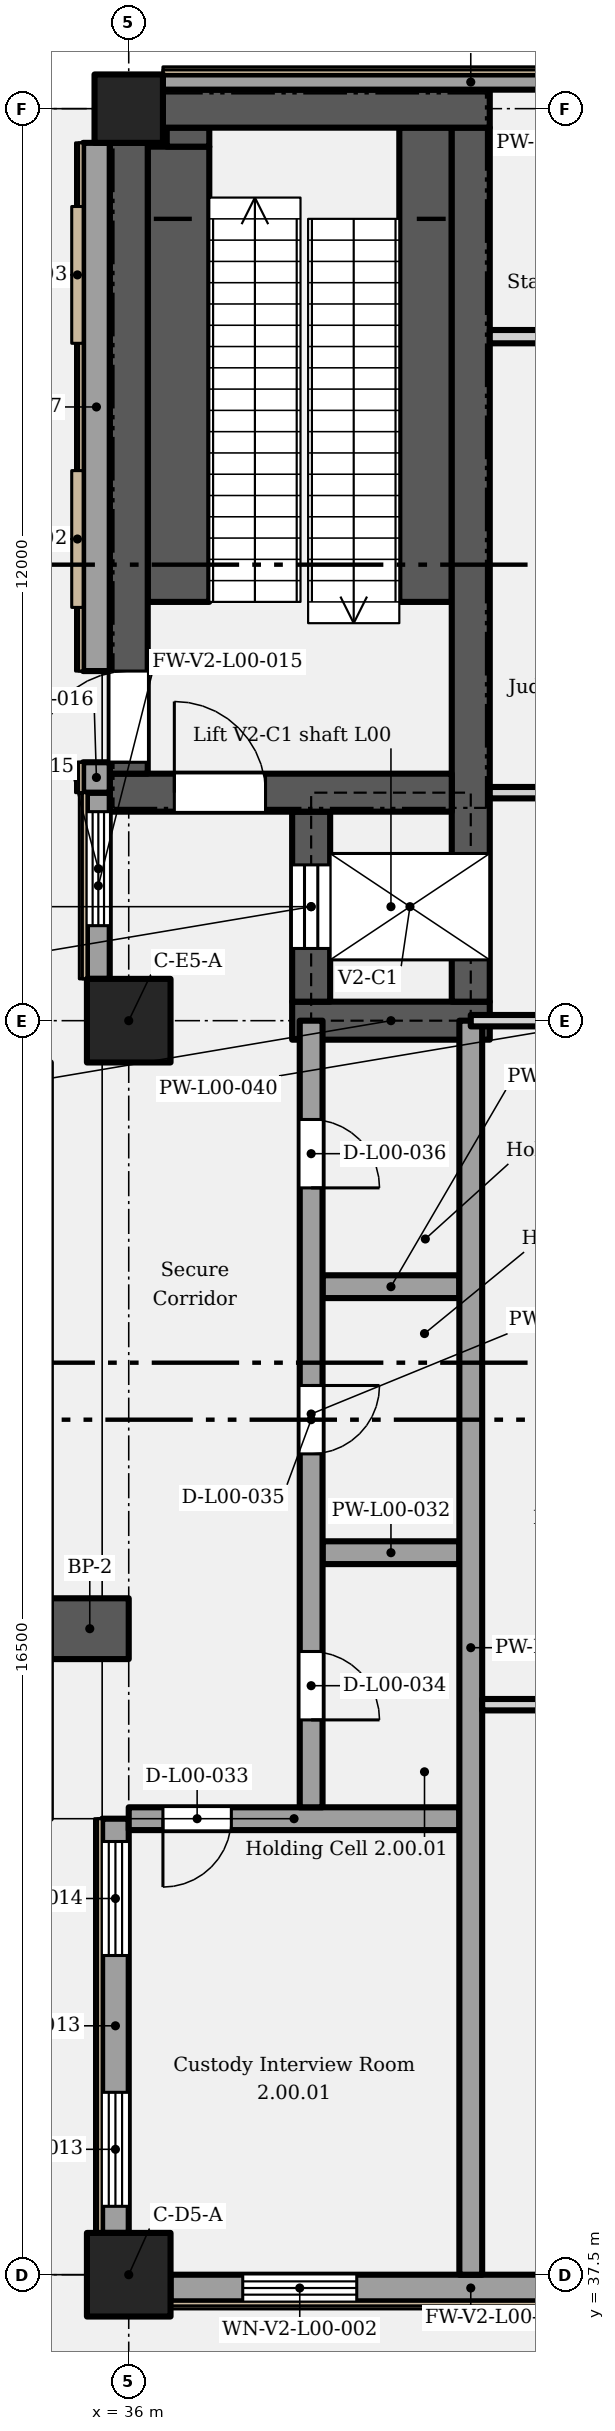
"""IFC4 building model, lengths in metres.
Left out: names, types, materials, properties, quantities, classifications, styles, units other than length and angle.
Written with IfcOpenShell. Run it as: python <this file> out.ifc"""

import sys

from ifc_helpers import new_model, si_unit, direction, frame, frame_2d, origin, origin_2d, place, context, subcontext, project, spatial, rectangle, extrude, element, fill, save


model = new_model("IFC4")
c1 = context("Model", 3, precision=1e-05, world=origin(), true_north=direction((0.0, 1.0)))
c2 = subcontext(c1, "Body", "Model", "MODEL_VIEW")
j1 = project(units=[si_unit("LENGTHUNIT", "METRE"), si_unit("PLANEANGLEUNIT", "RADIAN")], contexts=[c1])
p1 = place(None, origin())
s1 = spatial("IfcSite", under=j1, at=p1, CompositionType="ELEMENT")
p2 = place(p1, origin())
s2 = spatial("IfcBuilding", under=s1, at=p2, CompositionType="ELEMENT")
p3 = place(p2, origin())
s3 = spatial("IfcBuildingStorey", under=s2, at=p3, CompositionType="ELEMENT", Elevation=0.0)
for number, where, z_axis, x_axis in (
    (1, (36.0, 37.5, 0.0), (0.0, 0.0, 1.0), (1.0, 0.0, 0.0)),
    (2, (36.0, 54.0, 0.0), (0.0, 0.0, 1.0), (1.0, 0.0, 0.0)),
):
    element("IfcColumn", number, at=place(p3, frame(where, z_axis=z_axis, x_axis=x_axis)), inside=s3, PredefinedType="COLUMN", context=c2, shape_type="SweptSolid", body=[
        extrude(rectangle(XDim=1.1, YDim=1.1, at=origin_2d()), origin(), (0.0, 0.0, 1.0), 6.6),
    ])
p4 = place(p3, frame((36.0, 66.0, 0.0), z_axis=(0.0, 0.0, 1.0), x_axis=(1.0, 0.0, 0.0)))
e3 = element("IfcColumn", 3, at=p4, inside=s3, PredefinedType="COLUMN", context=c2, shape_type="SweptSolid", body=[
    extrude(rectangle(XDim=0.9, YDim=0.9, at=origin_2d()), origin(), (0.0, 0.0, 1.0), 6.6),
])
p5 = place(p3, frame((38.15, 54.0, 0.0), z_axis=(0.0, 0.0, 1.0), x_axis=(1.0, 0.0, 0.0)))
e4 = element("IfcWall", 4, at=p5, inside=s3, PredefinedType="SHEAR", context=c2, shape_type="SweptSolid", body=[
    extrude(rectangle(XDim=2.6, YDim=0.5, at=frame_2d((1.3, 0.0))), origin(), (0.0, 0.0, 1.0), 6.3),
])
p6 = place(p3, frame((38.4, 54.25, 0.0), z_axis=(0.0, 0.0, 1.0), x_axis=(0.0, 1.0, 0.0)))
e5 = element("IfcWall", 5, at=p6, inside=s3, PredefinedType="SHEAR", context=c2, shape_type="SweptSolid", body=[
    extrude(rectangle(XDim=2.5, YDim=0.5, at=frame_2d((1.25, 0.0))), origin(), (0.0, 0.0, 1.0), 6.3),
])
p7 = place(p6, frame((0.7, 0.0, 0.0)))
e6 = element("IfcOpeningElement", 6, at=p7, cuts=e5, PredefinedType="OPENING", context=c2, shape_type="SweptSolid", body=[
    extrude(rectangle(XDim=1.1, YDim=2.1, at=frame_2d((0.55, 1.05))), frame((0.0, 0.26, 0.0), z_axis=(0.0, -1.0, 0.0), x_axis=(1.0, 0.0, 0.0)), (0.0, 0.0, 1.0), 0.52),
])
p8 = place(p3, frame((40.5, 54.25, 0.0), z_axis=(0.0, 0.0, 1.0), x_axis=(0.0, 1.0, 0.0)))
e7 = element("IfcWall", 7, at=p8, inside=s3, PredefinedType="SHEAR", context=c2, shape_type="SweptSolid", body=[
    extrude(rectangle(XDim=11.5, YDim=0.5, at=frame_2d((5.75, 0.0))), origin(), (0.0, 0.0, 1.0), 6.3),
])
p9 = place(p3, frame((35.75, 57.0, 0.0), z_axis=(0.0, 0.0, 1.0), x_axis=(1.0, 0.0, 0.0)))
e8 = element("IfcWall", 8, at=p9, inside=s3, PredefinedType="SHEAR", context=c2, shape_type="SweptSolid", body=[
    extrude(rectangle(XDim=4.5, YDim=0.5, at=frame_2d((2.25, 0.0))), origin(), (0.0, 0.0, 1.0), 6.3),
])
p10 = place(p9, frame((0.85, 0.0, 0.0)))
e9 = element("IfcOpeningElement", 9, at=p10, cuts=e8, PredefinedType="OPENING", context=c2, shape_type="SweptSolid", body=[
    extrude(rectangle(XDim=1.2, YDim=2.1, at=frame_2d((0.6, 1.05))), frame((0.0, 0.26, 0.0), z_axis=(0.0, -1.0, 0.0), x_axis=(1.0, 0.0, 0.0)), (0.0, 0.0, 1.0), 0.52),
])
p11 = place(p3, frame((36.0, 57.25, 0.0), z_axis=(0.0, 0.0, 1.0), x_axis=(0.0, 1.0, 0.0)))
e10 = element("IfcWall", 10, at=p11, inside=s3, PredefinedType="SHEAR", context=c2, shape_type="SweptSolid", body=[
    extrude(rectangle(XDim=8.3, YDim=0.5, at=frame_2d((4.15, 0.0))), origin(), (0.0, 0.0, 1.0), 6.3),
])
p12 = place(p11, frame((0.15, 0.0, 0.0)))
e11 = element("IfcOpeningElement", 11, at=p12, cuts=e10, PredefinedType="OPENING", context=c2, shape_type="SweptSolid", body=[
    extrude(rectangle(XDim=1.2, YDim=2.1, at=frame_2d((0.6, 1.05))), frame((0.0, 0.26, 0.0), z_axis=(0.0, -1.0, 0.0), x_axis=(1.0, 0.0, 0.0)), (0.0, 0.0, 1.0), 0.52),
])
p13 = place(p3, frame((36.45, 66.0, 0.0), z_axis=(0.0, 0.0, 1.0), x_axis=(1.0, 0.0, 0.0)))
e12 = element("IfcWall", 12, at=p13, inside=s3, PredefinedType="SHEAR", context=c2, shape_type="SweptSolid", body=[
    extrude(rectangle(XDim=4.3, YDim=0.5, at=frame_2d((2.15, 0.0))), origin(), (0.0, 0.0, 1.0), 6.3),
])
p14 = place(p3, frame((35.488, 45.6, 0.0), z_axis=(0.0, 0.0, 1.0), x_axis=(0.0, 1.0, 0.0)))
e13 = element("IfcWall", 13, at=p14, inside=s3, PredefinedType="SOLIDWALL", context=c2, shape_type="SweptSolid", body=[
    extrude(rectangle(XDim=0.8, YDim=1.025, at=frame_2d((0.4, 0.0))), origin(), (0.0, 0.0, 1.0), 5.8),
])
p15 = place(p3, frame((36.55, 37.325, 0.0), z_axis=(0.0, 0.0, 1.0), x_axis=(1.0, 0.0, 0.0)))
e14 = element("IfcWall", 14, at=p15, inside=s3, PredefinedType="SOLIDWALL", context=c2, shape_type="SweptSolid", body=[
    extrude(rectangle(XDim=7.9, YDim=0.35, at=frame_2d((3.95, 0.0))), origin(), (0.0, 0.0, 1.0), 6.3),
])
p16 = place(p15, frame((6.425, 0.0, 1.05)))
e15 = element("IfcOpeningElement", 15, at=p16, cuts=e14, PredefinedType="OPENING", context=c2, shape_type="SweptSolid", body=[
    extrude(rectangle(XDim=1.05, YDim=2.4, at=frame_2d((0.525, 1.2))), frame((0.0, 0.185, 0.0), z_axis=(0.0, -1.0, 0.0), x_axis=(1.0, 0.0, 0.0)), (0.0, 0.0, 1.0), 0.37),
])
p17 = place(p15, frame((0.95, 0.0, 1.05)))
e16 = element("IfcOpeningElement", 16, at=p17, cuts=e14, PredefinedType="OPENING", context=c2, shape_type="SweptSolid", body=[
    extrude(rectangle(XDim=1.5, YDim=3.9, at=frame_2d((0.75, 1.95))), frame((0.0, 0.185, 0.0), z_axis=(0.0, -1.0, 0.0), x_axis=(1.0, 0.0, 0.0)), (0.0, 0.0, 1.0), 0.37),
])
p18 = place(p3, frame((36.45, 66.35, 0.0), z_axis=(0.0, 0.0, 1.0), x_axis=(1.0, 0.0, 0.0)))
e17 = element("IfcWall", 17, at=p18, inside=s3, PredefinedType="SOLIDWALL", context=c2, shape_type="SweptSolid", body=[
    extrude(rectangle(XDim=8.1, YDim=0.2, at=frame_2d((4.05, 0.0))), origin(), (0.0, 0.0, 1.0), 6.3),
])
p19 = place(p18, frame((5.7, 0.0, 0.0)))
e18 = element("IfcOpeningElement", 18, at=p19, cuts=e17, PredefinedType="OPENING", context=c2, shape_type="SweptSolid", body=[
    extrude(rectangle(XDim=1.2, YDim=2.1, at=frame_2d((0.6, 1.05))), frame((0.0, 0.11, 0.0), z_axis=(0.0, -1.0, 0.0), x_axis=(1.0, 0.0, 0.0)), (0.0, 0.0, 1.0), 0.22),
])
p20 = place(p3, frame((35.825, 38.05, 0.0), z_axis=(0.0, 0.0, 1.0), x_axis=(0.0, 1.0, 0.0)))
e19 = element("IfcWall", 19, at=p20, inside=s3, PredefinedType="SOLIDWALL", context=c2, shape_type="SweptSolid", body=[
    extrude(rectangle(XDim=5.45, YDim=0.35, at=frame_2d((2.725, 0.0))), origin(), (0.0, 0.0, 1.0), 6.3),
])
p21 = place(p20, frame((0.35, 0.0, 1.05)))
e20 = element("IfcOpeningElement", 20, at=p21, cuts=e19, PredefinedType="OPENING", context=c2, shape_type="SweptSolid", body=[
    extrude(rectangle(XDim=1.5, YDim=3.9, at=frame_2d((0.75, 1.95))), frame((0.0, 0.185, 0.0), z_axis=(0.0, -1.0, 0.0), x_axis=(1.0, 0.0, 0.0)), (0.0, 0.0, 1.0), 0.37),
])
p22 = place(p20, frame((3.65, 0.0, 1.05)))
e21 = element("IfcOpeningElement", 21, at=p22, cuts=e19, PredefinedType="OPENING", context=c2, shape_type="SweptSolid", body=[
    extrude(rectangle(XDim=1.5, YDim=3.9, at=frame_2d((0.75, 1.95))), frame((0.0, 0.185, 0.0), z_axis=(0.0, -1.0, 0.0), x_axis=(1.0, 0.0, 0.0)), (0.0, 0.0, 1.0), 0.37),
])
p23 = place(p3, frame((35.6, 54.55, 0.0), z_axis=(0.0, 0.0, 1.0), x_axis=(0.0, 1.0, 0.0)))
e22 = element("IfcWall", 22, at=p23, inside=s3, PredefinedType="SOLIDWALL", context=c2, shape_type="SweptSolid", body=[
    extrude(rectangle(XDim=2.45, YDim=0.3, at=frame_2d((1.225, 0.0))), origin(), (0.0, 0.0, 1.0), 6.3),
])
p24 = place(p23, frame((0.7, 0.0, 1.05)))
e23 = element("IfcOpeningElement", 23, at=p24, cuts=e22, PredefinedType="OPENING", context=c2, shape_type="SweptSolid", body=[
    extrude(rectangle(XDim=1.5, YDim=3.9, at=frame_2d((0.75, 1.95))), frame((0.0, 0.16, 0.0), z_axis=(0.0, -1.0, 0.0), x_axis=(1.0, 0.0, 0.0)), (0.0, 0.0, 1.0), 0.32),
])
p25 = place(p3, frame((35.575, 57.0, 0.0), z_axis=(0.0, 0.0, 1.0), x_axis=(0.0, 1.0, 0.0)))
e24 = element("IfcWall", 24, at=p25, inside=s3, PredefinedType="SOLIDWALL", context=c2, shape_type="SweptSolid", body=[
    extrude(rectangle(XDim=0.4, YDim=0.35, at=frame_2d((0.2, 0.0))), origin(), (0.0, 0.0, 1.0), 6.3),
])
p26 = place(p3, frame((35.575, 58.6, 0.0), z_axis=(0.0, 0.0, 1.0), x_axis=(0.0, 1.0, 0.0)))
e25 = element("IfcWall", 25, at=p26, inside=s3, PredefinedType="SOLIDWALL", context=c2, shape_type="SweptSolid", body=[
    extrude(rectangle(XDim=6.95, YDim=0.35, at=frame_2d((3.475, 0.0))), origin(), (0.0, 0.0, 1.0), 6.3),
])
p27 = place(p3, frame((36.0, 43.5, 0.0), z_axis=(0.0, 0.0, 1.0), x_axis=(1.0, 0.0, 0.0)))
e26 = element("IfcWall", 26, at=p27, inside=s3, PredefinedType="PARTITIONING", context=c2, shape_type="SweptSolid", body=[
    extrude(rectangle(XDim=4.35, YDim=0.3, at=frame_2d((2.175, 0.0))), origin(), (0.0, 0.0, 1.0), 6.3),
])
p28 = place(p27, frame((1.35, 0.0, 0.0), z_axis=(0.0, 0.0, 1.0), x_axis=(-1.0, 0.0, 0.0)))
e27 = element("IfcOpeningElement", 27, at=p28, cuts=e26, PredefinedType="OPENING", context=c2, shape_type="SweptSolid", body=[
    extrude(rectangle(XDim=0.9, YDim=2.1, at=frame_2d((0.45, 1.05))), frame((0.0, 0.16, 0.0), z_axis=(0.0, -1.0, 0.0), x_axis=(1.0, 0.0, 0.0)), (0.0, 0.0, 1.0), 0.32),
])
p29 = place(p3, frame((40.65, 45.0, 0.0), z_axis=(0.0, 0.0, 1.0), x_axis=(1.0, 0.0, 0.0)))
e28 = element("IfcWall", 28, at=p29, inside=s3, PredefinedType="PARTITIONING", context=c2, shape_type="SweptSolid", body=[
    extrude(rectangle(XDim=8.775, YDim=0.15, at=frame_2d((4.388, 0.0))), origin(), (0.0, 0.0, 1.0), 6.3),
])
for number, where, z_axis, x_axis in (
    (29, (38.55, 47.0, 0.0), (0.0, 0.0, 1.0), (1.0, 0.0, 0.0)),
    (30, (38.55, 50.5, 0.0), (0.0, 0.0, 1.0), (1.0, 0.0, 0.0)),
):
    element("IfcWall", number, at=place(p3, frame(where, z_axis=z_axis, x_axis=x_axis)), inside=s3, PredefinedType="PARTITIONING", context=c2, shape_type="SweptSolid", body=[
        extrude(rectangle(XDim=1.8, YDim=0.3, at=frame_2d((0.9, 0.0))), origin(), (0.0, 0.0, 1.0), 6.3),
    ])
p30 = place(p3, frame((40.5, 54.0, 0.0), z_axis=(0.0, 0.0, 1.0), x_axis=(1.0, 0.0, 0.0)))
e31 = element("IfcWall", 31, at=p30, inside=s3, PredefinedType="PARTITIONING", context=c2, shape_type="SweptSolid", body=[
    extrude(rectangle(XDim=3.6, YDim=0.15, at=frame_2d((1.8, 0.0))), origin(), (0.0, 0.0, 1.0), 5.55),
])
p31 = place(p3, frame((40.75, 57.0, 0.0), z_axis=(0.0, 0.0, 1.0), x_axis=(1.0, 0.0, 0.0)))
e32 = element("IfcWall", 32, at=p31, inside=s3, PredefinedType="PARTITIONING", context=c2, shape_type="SweptSolid", body=[
    extrude(rectangle(XDim=3.275, YDim=0.15, at=frame_2d((1.637, 0.0))), origin(), (0.0, 0.0, 1.0), 6.3),
])
p32 = place(p3, frame((40.75, 63.0, 0.0), z_axis=(0.0, 0.0, 1.0), x_axis=(1.0, 0.0, 0.0)))
e33 = element("IfcWall", 33, at=p32, inside=s3, PredefinedType="PARTITIONING", context=c2, shape_type="SweptSolid", body=[
    extrude(rectangle(XDim=3.35, YDim=0.175, at=frame_2d((1.675, 0.0))), origin(), (0.0, 0.0, 1.0), 6.3),
])
p33 = place(p3, frame((38.4, 43.65, 0.0), z_axis=(0.0, 0.0, 1.0), x_axis=(0.0, 1.0, 0.0)))
e34 = element("IfcWall", 34, at=p33, inside=s3, PredefinedType="PARTITIONING", context=c2, shape_type="SweptSolid", body=[
    extrude(rectangle(XDim=10.35, YDim=0.3, at=frame_2d((5.175, 0.0))), origin(), (0.0, 0.0, 1.0), 6.3),
])
p34 = place(p33, frame((2.05, 0.0, 0.0), z_axis=(0.0, 0.0, 1.0), x_axis=(-1.0, 0.0, 0.0)))
e35 = element("IfcOpeningElement", 35, at=p34, cuts=e34, PredefinedType="OPENING", context=c2, shape_type="SweptSolid", body=[
    extrude(rectangle(XDim=0.9, YDim=2.0, at=frame_2d((0.45, 1.0))), frame((0.0, 0.16, 0.0), z_axis=(0.0, -1.0, 0.0), x_axis=(1.0, 0.0, 0.0)), (0.0, 0.0, 1.0), 0.32),
])
p35 = place(p33, frame((5.55, 0.0, 0.0), z_axis=(0.0, 0.0, 1.0), x_axis=(-1.0, 0.0, 0.0)))
e36 = element("IfcOpeningElement", 36, at=p35, cuts=e34, PredefinedType="OPENING", context=c2, shape_type="SweptSolid", body=[
    extrude(rectangle(XDim=0.9, YDim=2.0, at=frame_2d((0.45, 1.0))), frame((0.0, 0.16, 0.0), z_axis=(0.0, -1.0, 0.0), x_axis=(1.0, 0.0, 0.0)), (0.0, 0.0, 1.0), 0.32),
])
p36 = place(p33, frame((9.05, 0.0, 0.0), z_axis=(0.0, 0.0, 1.0), x_axis=(-1.0, 0.0, 0.0)))
e37 = element("IfcOpeningElement", 37, at=p36, cuts=e34, PredefinedType="OPENING", context=c2, shape_type="SweptSolid", body=[
    extrude(rectangle(XDim=0.9, YDim=2.0, at=frame_2d((0.45, 1.0))), frame((0.0, 0.16, 0.0), z_axis=(0.0, -1.0, 0.0), x_axis=(1.0, 0.0, 0.0)), (0.0, 0.0, 1.0), 0.32),
])
p37 = place(p3, frame((40.5, 37.5, 0.0), z_axis=(0.0, 0.0, 1.0), x_axis=(0.0, 1.0, 0.0)))
e38 = element("IfcWall", 38, at=p37, inside=s3, PredefinedType="PARTITIONING", context=c2, shape_type="SweptSolid", body=[
    extrude(rectangle(XDim=16.5, YDim=0.3, at=frame_2d((8.25, 0.0))), origin(), (0.0, 0.0, 1.0), 6.3),
])
p38 = place(p3, frame((36.655, 59.51, 0.0), z_axis=(0.0, 0.0, 1.0), x_axis=(0.0, 1.0, 0.0)))
e39 = element("IfcWall", 39, at=p38, inside=s3, PredefinedType="SHEAR", context=c2, shape_type="SweptSolid", body=[
    extrude(rectangle(XDim=5.99, YDim=0.81, at=frame_2d((2.995, 0.0))), origin(), (0.0, 0.0, 1.0), 3.1),
])
p39 = place(p3, frame((36.78, 65.5, 0.0), z_axis=(0.0, 0.0, 1.0), x_axis=(0.0, 1.0, 0.0)))
e40 = element("IfcWall", 40, at=p39, inside=s3, PredefinedType="SHEAR", context=c2, shape_type="SweptSolid", body=[
    extrude(rectangle(XDim=0.25, YDim=0.56, at=frame_2d((0.125, 0.0))), origin(), (0.0, 0.0, 1.0), 3.1),
])
p40 = place(p3, frame((39.905, 59.51, 0.0), z_axis=(0.0, 0.0, 1.0), x_axis=(0.0, 1.0, 0.0)))
e41 = element("IfcWall", 41, at=p40, inside=s3, PredefinedType="SHEAR", context=c2, shape_type="SweptSolid", body=[
    extrude(rectangle(XDim=6.24, YDim=0.69, at=frame_2d((3.12, 0.0))), origin(), (0.0, 0.0, 1.0), 3.1),
])
p41 = place(p17, origin())
e42 = element("IfcWindow", 42, at=p41, inside=s3, PartitioningType="SINGLE_PANEL", PredefinedType="WINDOW", context=c2, shape_type="SweptSolid", body=[
    extrude(rectangle(XDim=1.5, YDim=3.9, at=frame_2d((0.75, 1.95))), frame((0.0, 0.03, 0.0), z_axis=(0.0, -1.0, 0.0), x_axis=(1.0, 0.0, 0.0)), (0.0, 0.0, 1.0), 0.06),
])
fill(e16, e42)
p42 = place(p21, origin())
e43 = element("IfcWindow", 43, at=p42, inside=s3, PartitioningType="SINGLE_PANEL", PredefinedType="WINDOW", context=c2, shape_type="SweptSolid", body=[
    extrude(rectangle(XDim=1.5, YDim=3.9, at=frame_2d((0.75, 1.95))), frame((0.0, 0.03, 0.0), z_axis=(0.0, -1.0, 0.0), x_axis=(1.0, 0.0, 0.0)), (0.0, 0.0, 1.0), 0.06),
])
fill(e20, e43)
p43 = place(p22, origin())
e44 = element("IfcWindow", 44, at=p43, inside=s3, PartitioningType="SINGLE_PANEL", PredefinedType="WINDOW", context=c2, shape_type="SweptSolid", body=[
    extrude(rectangle(XDim=1.5, YDim=3.9, at=frame_2d((0.75, 1.95))), frame((0.0, 0.03, 0.0), z_axis=(0.0, -1.0, 0.0), x_axis=(1.0, 0.0, 0.0)), (0.0, 0.0, 1.0), 0.06),
])
fill(e21, e44)
p44 = place(p24, origin())
e45 = element("IfcWindow", 45, at=p44, inside=s3, PartitioningType="SINGLE_PANEL", PredefinedType="WINDOW", context=c2, shape_type="SweptSolid", body=[
    extrude(rectangle(XDim=1.5, YDim=3.9, at=frame_2d((0.75, 1.95))), frame((0.0, 0.03, 0.0), z_axis=(0.0, -1.0, 0.0), x_axis=(1.0, 0.0, 0.0)), (0.0, 0.0, 1.0), 0.06),
])
fill(e23, e45)
p45 = place(p12, origin())
e46 = element("IfcDoor", 46, at=p45, inside=s3, OperationType="SINGLE_SWING_RIGHT", PredefinedType="DOOR", context=c2, shape_type="SweptSolid", body=[
    extrude(rectangle(XDim=1.2, YDim=2.1, at=frame_2d((0.6, 1.05))), frame((0.0, 0.025, 0.0), z_axis=(0.0, -1.0, 0.0), x_axis=(1.0, 0.0, 0.0)), (0.0, 0.0, 1.0), 0.05),
])
fill(e11, e46)
p46 = place(p7, origin())
e47 = element("IfcDoor", 47, at=p46, inside=s3, OperationType="SLIDING_TO_LEFT", PredefinedType="DOOR", context=c2, shape_type="SweptSolid", body=[
    extrude(rectangle(XDim=1.1, YDim=2.1, at=frame_2d((0.55, 1.05))), frame((0.0, 0.025, 0.0), z_axis=(0.0, -1.0, 0.0), x_axis=(1.0, 0.0, 0.0)), (0.0, 0.0, 1.0), 0.05),
])
fill(e6, e47)
p47 = place(p10, origin())
e48 = element("IfcDoor", 48, at=p47, inside=s3, OperationType="SINGLE_SWING_LEFT", PredefinedType="DOOR", context=c2, shape_type="SweptSolid", body=[
    extrude(rectangle(XDim=1.2, YDim=2.1, at=frame_2d((0.6, 1.05))), frame((0.0, 0.025, 0.0), z_axis=(0.0, -1.0, 0.0), x_axis=(1.0, 0.0, 0.0)), (0.0, 0.0, 1.0), 0.05),
])
fill(e9, e48)
p48 = place(p28, origin())
e49 = element("IfcDoor", 49, at=p48, inside=s3, OperationType="SINGLE_SWING_RIGHT", PredefinedType="DOOR", context=c2, shape_type="SweptSolid", body=[
    extrude(rectangle(XDim=0.9, YDim=2.1, at=frame_2d((0.45, 1.05))), frame((0.0, 0.025, 0.0), z_axis=(0.0, -1.0, 0.0), x_axis=(1.0, 0.0, 0.0)), (0.0, 0.0, 1.0), 0.05),
])
fill(e27, e49)
p49 = place(p34, origin())
e50 = element("IfcDoor", 50, at=p49, inside=s3, OperationType="SINGLE_SWING_RIGHT", PredefinedType="DOOR", context=c2, shape_type="SweptSolid", body=[
    extrude(rectangle(XDim=0.9, YDim=2.0, at=frame_2d((0.45, 1.0))), frame((0.0, 0.025, 0.0), z_axis=(0.0, -1.0, 0.0), x_axis=(1.0, 0.0, 0.0)), (0.0, 0.0, 1.0), 0.05),
])
fill(e35, e50)
p50 = place(p35, origin())
e51 = element("IfcDoor", 51, at=p50, inside=s3, OperationType="SINGLE_SWING_LEFT", PredefinedType="DOOR", context=c2, shape_type="SweptSolid", body=[
    extrude(rectangle(XDim=0.9, YDim=2.0, at=frame_2d((0.45, 1.0))), frame((0.0, 0.025, 0.0), z_axis=(0.0, -1.0, 0.0), x_axis=(1.0, 0.0, 0.0)), (0.0, 0.0, 1.0), 0.05),
])
fill(e36, e51)
p51 = place(p36, origin())
e52 = element("IfcDoor", 52, at=p51, inside=s3, OperationType="SINGLE_SWING_RIGHT", PredefinedType="DOOR", context=c2, shape_type="SweptSolid", body=[
    extrude(rectangle(XDim=0.9, YDim=2.0, at=frame_2d((0.45, 1.0))), frame((0.0, 0.025, 0.0), z_axis=(0.0, -1.0, 0.0), x_axis=(1.0, 0.0, 0.0)), (0.0, 0.0, 1.0), 0.05),
])
fill(e37, e52)
save(model, sys.argv[1])
